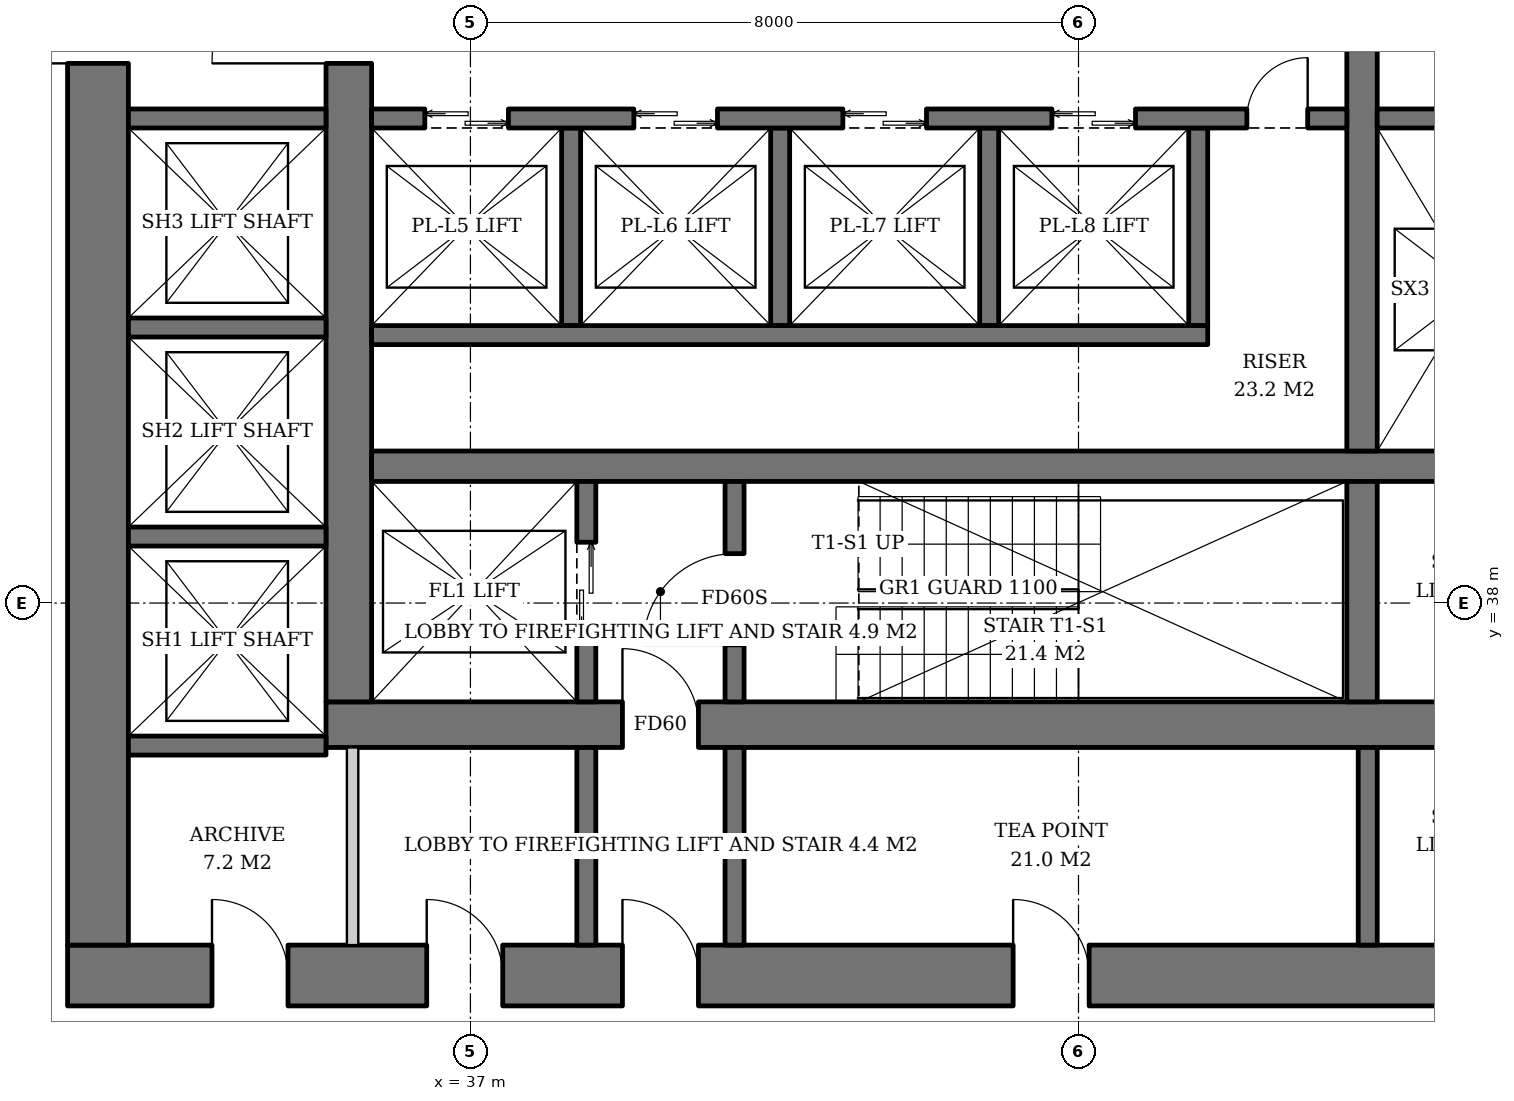
"""IFC4 building model, lengths in metres.
Left out: names, types, materials, properties, quantities, classifications, styles, units other than length and angle.
Written with IfcOpenShell. Run it as: python <this file> out.ifc"""

import sys

from ifc_helpers import new_model, si_unit, direction, frame, frame_2d, origin, place, context, subcontext, project, spatial, rectangle, extrude, element, fill, save


model = new_model("IFC4")
c1 = context("Model", 3, precision=1e-05, world=origin(), true_north=direction((0.0, 1.0)))
c2 = subcontext(c1, "Body", "Model", "MODEL_VIEW")
j1 = project(units=[si_unit("LENGTHUNIT", "METRE"), si_unit("PLANEANGLEUNIT", "RADIAN")], contexts=[c1])
p1 = place(None, origin())
s1 = spatial("IfcSite", under=j1, at=p1, CompositionType="ELEMENT")
p2 = place(p1, origin())
s2 = spatial("IfcBuilding", under=s1, at=p2, CompositionType="ELEMENT")
p3 = place(p2, frame((0.0, 0.0, 40.0)))
s3 = spatial("IfcBuildingStorey", under=s2, at=p3, CompositionType="ELEMENT", Elevation=40.0)
p4 = place(p3, frame((35.1, 36.4, 0.0), z_axis=(0.0, 0.0, 1.0), x_axis=(1.0, 0.0, 0.0)))
e1 = element("IfcWall", 1, at=p4, inside=s3, PredefinedType="SHEAR", context=c2, shape_type="SweptSolid", body=[
    extrude(rectangle(XDim=19.8, YDim=0.6, at=frame_2d((9.9, 0.0))), origin(), (0.0, 0.0, 1.0), 3.8),
])
p5 = place(p4, frame((3.9, 0.0, 0.0)))
e2 = element("IfcOpeningElement", 2, at=p5, cuts=e1, PredefinedType="OPENING", context=c2, shape_type="SweptSolid", body=[
    extrude(rectangle(XDim=1.0, YDim=2.1, at=frame_2d((0.5, 1.05))), frame((0.0, 0.31, 0.0), z_axis=(0.0, -1.0, 0.0), x_axis=(1.0, 0.0, 0.0)), (0.0, 0.0, 1.0), 0.62),
])
p6 = place(p4, frame((15.35, 0.0, 0.0)))
e3 = element("IfcOpeningElement", 3, at=p6, cuts=e1, PredefinedType="OPENING", context=c2, shape_type="SweptSolid", body=[
    extrude(rectangle(XDim=1.0, YDim=2.1, at=frame_2d((0.5, 1.05))), frame((0.0, 0.31, 0.0), z_axis=(0.0, -1.0, 0.0), x_axis=(1.0, 0.0, 0.0)), (0.0, 0.0, 1.0), 0.62),
])
p7 = place(p3, frame((35.4, 36.7, 0.0), z_axis=(0.0, 0.0, 1.0), x_axis=(0.0, 1.0, 0.0)))
e4 = element("IfcWall", 4, at=p7, inside=s3, PredefinedType="SHEAR", context=c2, shape_type="SweptSolid", body=[
    extrude(rectangle(XDim=18.6, YDim=0.6, at=frame_2d((9.3, 0.0))), origin(), (0.0, 0.0, 1.0), 3.8),
])
p8 = place(p7, frame((8.4, 0.0, 0.0)))
e5 = element("IfcOpeningElement", 5, at=p8, cuts=e4, PredefinedType="OPENING", context=c2, shape_type="SweptSolid", body=[
    extrude(rectangle(XDim=1.8, YDim=2.4, at=frame_2d((0.9, 1.2))), frame((0.0, 0.31, 0.0), z_axis=(0.0, -1.0, 0.0), x_axis=(1.0, 0.0, 0.0)), (0.0, 0.0, 1.0), 0.62),
])
p9 = place(p3, frame((31.7, 33.1, 0.0), z_axis=(0.0, 0.0, 1.0), x_axis=(1.0, 0.0, 0.0)))
e6 = element("IfcWall", 6, at=p9, inside=s3, PredefinedType="SHEAR", context=c2, shape_type="SweptSolid", body=[
    extrude(rectangle(XDim=26.6, YDim=0.8, at=frame_2d((13.3, 0.0))), origin(), (0.0, 0.0, 1.0), 3.8),
])
p10 = place(p9, frame((7.3, 0.0, 0.0)))
e7 = element("IfcOpeningElement", 7, at=p10, cuts=e6, PredefinedType="OPENING", context=c2, shape_type="SweptSolid", body=[
    extrude(rectangle(XDim=1.0, YDim=2.1, at=frame_2d((0.5, 1.05))), frame((0.0, 0.41, 0.0), z_axis=(0.0, -1.0, 0.0), x_axis=(1.0, 0.0, 0.0)), (0.0, 0.0, 1.0), 0.82),
])
p11 = place(p9, frame((18.75, 0.0, 0.0)))
e8 = element("IfcOpeningElement", 8, at=p11, cuts=e6, PredefinedType="OPENING", context=c2, shape_type="SweptSolid", body=[
    extrude(rectangle(XDim=1.0, YDim=2.1, at=frame_2d((0.5, 1.05))), frame((0.0, 0.41, 0.0), z_axis=(0.0, -1.0, 0.0), x_axis=(1.0, 0.0, 0.0)), (0.0, 0.0, 1.0), 0.82),
])
p12 = place(p9, frame((1.9, 0.0, 0.0)))
e9 = element("IfcOpeningElement", 9, at=p12, cuts=e6, PredefinedType="OPENING", context=c2, shape_type="SweptSolid", body=[
    extrude(rectangle(XDim=1.0, YDim=2.1, at=frame_2d((0.5, 1.05))), frame((0.0, 0.41, 0.0), z_axis=(0.0, -1.0, 0.0), x_axis=(1.0, 0.0, 0.0)), (0.0, 0.0, 1.0), 0.82),
])
p13 = place(p9, frame((4.725, 0.0, 0.0)))
e10 = element("IfcOpeningElement", 10, at=p13, cuts=e6, PredefinedType="OPENING", context=c2, shape_type="SweptSolid", body=[
    extrude(rectangle(XDim=1.0, YDim=2.1, at=frame_2d((0.5, 1.05))), frame((0.0, 0.41, 0.0), z_axis=(0.0, -1.0, 0.0), x_axis=(1.0, 0.0, 0.0)), (0.0, 0.0, 1.0), 0.82),
])
p14 = place(p9, frame((12.44, 0.0, 0.0)))
e11 = element("IfcOpeningElement", 11, at=p14, cuts=e6, PredefinedType="OPENING", context=c2, shape_type="SweptSolid", body=[
    extrude(rectangle(XDim=1.0, YDim=2.1, at=frame_2d((0.5, 1.05))), frame((0.0, 0.41, 0.0), z_axis=(0.0, -1.0, 0.0), x_axis=(1.0, 0.0, 0.0)), (0.0, 0.0, 1.0), 0.82),
])
p15 = place(p9, frame((20.626, 0.0, 0.0)))
e12 = element("IfcOpeningElement", 12, at=p15, cuts=e6, PredefinedType="OPENING", context=c2, shape_type="SweptSolid", body=[
    extrude(rectangle(XDim=1.0, YDim=2.1, at=frame_2d((0.5, 1.05))), frame((0.0, 0.41, 0.0), z_axis=(0.0, -1.0, 0.0), x_axis=(1.0, 0.0, 0.0)), (0.0, 0.0, 1.0), 0.82),
])
p16 = place(p9, frame((23.476, 0.0, 0.0)))
e13 = element("IfcOpeningElement", 13, at=p16, cuts=e6, PredefinedType="OPENING", context=c2, shape_type="SweptSolid", body=[
    extrude(rectangle(XDim=1.0, YDim=2.1, at=frame_2d((0.5, 1.05))), frame((0.0, 0.41, 0.0), z_axis=(0.0, -1.0, 0.0), x_axis=(1.0, 0.0, 0.0)), (0.0, 0.0, 1.0), 0.82),
])
p17 = place(p3, frame((32.1, 33.5, 0.0), z_axis=(0.0, 0.0, 1.0), x_axis=(0.0, 1.0, 0.0)))
e14 = element("IfcWall", 14, at=p17, inside=s3, PredefinedType="SHEAR", context=c2, shape_type="SweptSolid", body=[
    extrude(rectangle(XDim=25.0, YDim=0.8, at=frame_2d((12.5, 0.0))), origin(), (0.0, 0.0, 1.0), 3.8),
])
p18 = place(p17, frame((11.6, 0.0, 0.0)))
e15 = element("IfcOpeningElement", 15, at=p18, cuts=e14, PredefinedType="OPENING", context=c2, shape_type="SweptSolid", body=[
    extrude(rectangle(XDim=1.8, YDim=2.4, at=frame_2d((0.9, 1.2))), frame((0.0, 0.41, 0.0), z_axis=(0.0, -1.0, 0.0), x_axis=(1.0, 0.0, 0.0)), (0.0, 0.0, 1.0), 0.82),
])
p19 = place(p3, frame((35.7, 39.8, 0.0), z_axis=(0.0, 0.0, 1.0), x_axis=(1.0, 0.0, 0.0)))
e16 = element("IfcWall", 16, at=p19, inside=s3, PredefinedType="SHEAR", context=c2, shape_type="SweptSolid", body=[
    extrude(rectangle(XDim=18.6, YDim=0.4, at=frame_2d((9.3, 0.0))), origin(), (0.0, 0.0, 1.0), 3.8),
])
p20 = place(p3, frame((48.73, 36.7, 0.0), z_axis=(0.0, 0.0, 1.0), x_axis=(0.0, 1.0, 0.0)))
e17 = element("IfcWall", 17, at=p20, inside=s3, PredefinedType="SHEAR", context=c2, shape_type="SweptSolid", body=[
    extrude(rectangle(XDim=2.9, YDim=0.4, at=frame_2d((1.45, 0.0))), origin(), (0.0, 0.0, 1.0), 3.8),
])
p21 = place(p3, frame((48.73, 40.0, 0.0), z_axis=(0.0, 0.0, 1.0), x_axis=(0.0, 1.0, 0.0)))
e18 = element("IfcWall", 18, at=p21, inside=s3, PredefinedType="SHEAR", context=c2, shape_type="SweptSolid", body=[
    extrude(rectangle(XDim=12.0, YDim=0.4, at=frame_2d((6.0, 0.0))), origin(), (0.0, 0.0, 1.0), 3.8),
])
p22 = place(p3, frame((38.525, 36.7, 0.0), z_axis=(0.0, 0.0, 1.0), x_axis=(0.0, 1.0, 0.0)))
e19 = element("IfcWall", 19, at=p22, inside=s3, PredefinedType="SHEAR", context=c2, shape_type="SweptSolid", body=[
    extrude(rectangle(XDim=2.9, YDim=0.25, at=frame_2d((1.45, 0.0))), origin(), (0.0, 0.0, 1.0), 3.8),
])
p23 = place(p22, frame((0.8, 0.0, 0.0)))
e20 = element("IfcOpeningElement", 20, at=p23, cuts=e19, PredefinedType="OPENING", context=c2, shape_type="SweptSolid", body=[
    extrude(rectangle(XDim=1.3, YDim=2.2, at=frame_2d((0.65, 1.1))), frame((0.0, 0.135, 0.0), z_axis=(0.0, -1.0, 0.0), x_axis=(1.0, 0.0, 0.0)), (0.0, 0.0, 1.0), 0.27),
])
p24 = place(p3, frame((40.475, 36.7, 0.0), z_axis=(0.0, 0.0, 1.0), x_axis=(0.0, 1.0, 0.0)))
e21 = element("IfcWall", 21, at=p24, inside=s3, PredefinedType="SHEAR", context=c2, shape_type="SweptSolid", body=[
    extrude(rectangle(XDim=2.9, YDim=0.25, at=frame_2d((1.45, 0.0))), origin(), (0.0, 0.0, 1.0), 3.8),
])
p25 = place(p24, frame((0.75, 0.0, 0.0)))
e22 = element("IfcOpeningElement", 22, at=p25, cuts=e21, PredefinedType="OPENING", context=c2, shape_type="SweptSolid", body=[
    extrude(rectangle(XDim=1.2, YDim=2.1, at=frame_2d((0.6, 1.05))), frame((0.0, 0.135, 0.0), z_axis=(0.0, -1.0, 0.0), x_axis=(1.0, 0.0, 0.0)), (0.0, 0.0, 1.0), 0.27),
])
for number, where, z_axis, x_axis in (
    (23, (38.325, 44.25, 0.0), (0.0, 0.0, 1.0), (0.0, -1.0, 0.0)),
    (24, (41.075, 44.25, 0.0), (0.0, 0.0, 1.0), (0.0, -1.0, 0.0)),
    (25, (43.825, 44.25, 0.0), (0.0, 0.0, 1.0), (0.0, -1.0, 0.0)),
    (26, (46.575, 44.25, 0.0), (0.0, 0.0, 1.0), (0.0, -1.0, 0.0)),
):
    element("IfcWall", number, at=place(p3, frame(where, z_axis=z_axis, x_axis=x_axis)), inside=s3, PredefinedType="SHEAR", context=c2, shape_type="SweptSolid", body=[
        extrude(rectangle(XDim=2.6, YDim=0.25, at=frame_2d((1.3, 0.0))), origin(), (0.0, 0.0, 1.0), 3.8),
    ])
p26 = place(p3, frame((35.7, 41.525, 0.0), z_axis=(0.0, 0.0, 1.0), x_axis=(1.0, 0.0, 0.0)))
e27 = element("IfcWall", 27, at=p26, inside=s3, PredefinedType="SHEAR", context=c2, shape_type="SweptSolid", body=[
    extrude(rectangle(XDim=11.0, YDim=0.25, at=frame_2d((5.5, 0.0))), origin(), (0.0, 0.0, 1.0), 3.8),
])
p27 = place(p3, frame((35.7, 44.375, 0.0), z_axis=(0.0, 0.0, 1.0), x_axis=(1.0, 0.0, 0.0)))
e28 = element("IfcWall", 28, at=p27, inside=s3, PredefinedType="SHEAR", context=c2, shape_type="SweptSolid", body=[
    extrude(rectangle(XDim=12.83, YDim=0.25, at=frame_2d((6.415, 0.0))), origin(), (0.0, 0.0, 1.0), 3.8),
])
p28 = place(p27, frame((0.7, 0.0, 0.0)))
e29 = element("IfcOpeningElement", 29, at=p28, cuts=e28, PredefinedType="OPENING", context=c2, shape_type="SweptSolid", body=[
    extrude(rectangle(XDim=1.1, YDim=2.2, at=frame_2d((0.55, 1.1))), frame((0.0, 0.135, 0.0), z_axis=(0.0, -1.0, 0.0), x_axis=(1.0, 0.0, 0.0)), (0.0, 0.0, 1.0), 0.27),
])
p29 = place(p27, frame((3.45, 0.0, 0.0)))
e30 = element("IfcOpeningElement", 30, at=p29, cuts=e28, PredefinedType="OPENING", context=c2, shape_type="SweptSolid", body=[
    extrude(rectangle(XDim=1.1, YDim=2.2, at=frame_2d((0.55, 1.1))), frame((0.0, 0.135, 0.0), z_axis=(0.0, -1.0, 0.0), x_axis=(1.0, 0.0, 0.0)), (0.0, 0.0, 1.0), 0.27),
])
p30 = place(p27, frame((6.2, 0.0, 0.0)))
e31 = element("IfcOpeningElement", 31, at=p30, cuts=e28, PredefinedType="OPENING", context=c2, shape_type="SweptSolid", body=[
    extrude(rectangle(XDim=1.1, YDim=2.2, at=frame_2d((0.55, 1.1))), frame((0.0, 0.135, 0.0), z_axis=(0.0, -1.0, 0.0), x_axis=(1.0, 0.0, 0.0)), (0.0, 0.0, 1.0), 0.27),
])
p31 = place(p27, frame((8.95, 0.0, 0.0)))
e32 = element("IfcOpeningElement", 32, at=p31, cuts=e28, PredefinedType="OPENING", context=c2, shape_type="SweptSolid", body=[
    extrude(rectangle(XDim=1.1, YDim=2.2, at=frame_2d((0.55, 1.1))), frame((0.0, 0.135, 0.0), z_axis=(0.0, -1.0, 0.0), x_axis=(1.0, 0.0, 0.0)), (0.0, 0.0, 1.0), 0.27),
])
p32 = place(p27, frame((11.515, 0.0, 0.0)))
e33 = element("IfcOpeningElement", 33, at=p32, cuts=e28, PredefinedType="OPENING", context=c2, shape_type="SweptSolid", body=[
    extrude(rectangle(XDim=0.8, YDim=2.0, at=frame_2d((0.4, 1.0))), frame((0.0, 0.135, 0.0), z_axis=(0.0, -1.0, 0.0), x_axis=(1.0, 0.0, 0.0)), (0.0, 0.0, 1.0), 0.27),
])
p33 = place(p3, frame((48.93, 44.375, 0.0), z_axis=(0.0, 0.0, 1.0), x_axis=(1.0, 0.0, 0.0)))
e34 = element("IfcWall", 34, at=p33, inside=s3, PredefinedType="SHEAR", context=c2, shape_type="SweptSolid", body=[
    extrude(rectangle(XDim=5.37, YDim=0.25, at=frame_2d((2.685, 0.0))), origin(), (0.0, 0.0, 1.0), 3.8),
])
for number, where, z_axis, x_axis in (
    (35, (32.5, 36.125, 0.0), (0.0, 0.0, 1.0), (1.0, 0.0, 0.0)),
    (36, (32.5, 38.875, 0.0), (0.0, 0.0, 1.0), (1.0, 0.0, 0.0)),
    (37, (32.5, 41.625, 0.0), (0.0, 0.0, 1.0), (1.0, 0.0, 0.0)),
    (38, (32.5, 44.375, 0.0), (0.0, 0.0, 1.0), (1.0, 0.0, 0.0)),
):
    element("IfcWall", number, at=place(p3, frame(where, z_axis=z_axis, x_axis=x_axis)), inside=s3, PredefinedType="SHEAR", context=c2, shape_type="SweptSolid", body=[
        extrude(rectangle(XDim=2.6, YDim=0.25, at=frame_2d((1.3, 0.0))), origin(), (0.0, 0.0, 1.0), 3.8),
    ])
for number, where, z_axis, x_axis in (
    (39, (38.525, 33.5, 0.0), (0.0, 0.0, 1.0), (0.0, 1.0, 0.0)),
    (40, (40.475, 33.5, 0.0), (0.0, 0.0, 1.0), (0.0, 1.0, 0.0)),
    (41, (48.805, 33.5, 0.0), (0.0, 0.0, 1.0), (0.0, 1.0, 0.0)),
):
    element("IfcWall", number, at=place(p3, frame(where, z_axis=z_axis, x_axis=x_axis)), inside=s3, PredefinedType="SOLIDWALL", context=c2, shape_type="SweptSolid", body=[
        extrude(rectangle(XDim=2.6, YDim=0.25, at=frame_2d((1.3, 0.0))), origin(), (0.0, 0.0, 1.0), 3.62),
    ])
p34 = place(p3, frame((35.45, 33.5, 0.0), z_axis=(0.0, 0.0, 1.0), x_axis=(0.0, 1.0, 0.0)))
e42 = element("IfcWall", 42, at=p34, inside=s3, PredefinedType="SOLIDWALL", context=c2, shape_type="SweptSolid", body=[
    extrude(rectangle(XDim=2.6, YDim=0.15, at=frame_2d((1.3, 0.0))), origin(), (0.0, 0.0, 1.0), 3.62),
])
p35 = place(p23, origin())
e43 = element("IfcDoor", 43, at=p35, inside=s3, OperationType="DOUBLE_DOOR_SLIDING", PredefinedType="DOOR", context=c2, shape_type="SweptSolid", body=[
    extrude(rectangle(XDim=1.3, YDim=2.2, at=frame_2d((0.65, 1.1))), frame((0.0, 0.025, 0.0), z_axis=(0.0, -1.0, 0.0), x_axis=(1.0, 0.0, 0.0)), (0.0, 0.0, 1.0), 0.05),
])
fill(e20, e43)
p36 = place(p25, origin())
e44 = element("IfcDoor", 44, at=p36, inside=s3, OperationType="SINGLE_SWING_LEFT", PredefinedType="DOOR", context=c2, shape_type="SweptSolid", body=[
    extrude(rectangle(XDim=1.2, YDim=2.1, at=frame_2d((0.6, 1.05))), frame((0.0, 0.025, 0.0), z_axis=(0.0, -1.0, 0.0), x_axis=(1.0, 0.0, 0.0)), (0.0, 0.0, 1.0), 0.05),
])
fill(e22, e44)
p37 = place(p28, origin())
e45 = element("IfcDoor", 45, at=p37, inside=s3, OperationType="DOUBLE_DOOR_SLIDING", PredefinedType="DOOR", context=c2, shape_type="SweptSolid", body=[
    extrude(rectangle(XDim=1.1, YDim=2.2, at=frame_2d((0.55, 1.1))), frame((0.0, 0.025, 0.0), z_axis=(0.0, -1.0, 0.0), x_axis=(1.0, 0.0, 0.0)), (0.0, 0.0, 1.0), 0.05),
])
fill(e29, e45)
p38 = place(p29, origin())
e46 = element("IfcDoor", 46, at=p38, inside=s3, OperationType="DOUBLE_DOOR_SLIDING", PredefinedType="DOOR", context=c2, shape_type="SweptSolid", body=[
    extrude(rectangle(XDim=1.1, YDim=2.2, at=frame_2d((0.55, 1.1))), frame((0.0, 0.025, 0.0), z_axis=(0.0, -1.0, 0.0), x_axis=(1.0, 0.0, 0.0)), (0.0, 0.0, 1.0), 0.05),
])
fill(e30, e46)
p39 = place(p30, origin())
e47 = element("IfcDoor", 47, at=p39, inside=s3, OperationType="DOUBLE_DOOR_SLIDING", PredefinedType="DOOR", context=c2, shape_type="SweptSolid", body=[
    extrude(rectangle(XDim=1.1, YDim=2.2, at=frame_2d((0.55, 1.1))), frame((0.0, 0.025, 0.0), z_axis=(0.0, -1.0, 0.0), x_axis=(1.0, 0.0, 0.0)), (0.0, 0.0, 1.0), 0.05),
])
fill(e31, e47)
p40 = place(p31, origin())
e48 = element("IfcDoor", 48, at=p40, inside=s3, OperationType="DOUBLE_DOOR_SLIDING", PredefinedType="DOOR", context=c2, shape_type="SweptSolid", body=[
    extrude(rectangle(XDim=1.1, YDim=2.2, at=frame_2d((0.55, 1.1))), frame((0.0, 0.025, 0.0), z_axis=(0.0, -1.0, 0.0), x_axis=(1.0, 0.0, 0.0)), (0.0, 0.0, 1.0), 0.05),
])
fill(e32, e48)
p41 = place(p32, origin())
e49 = element("IfcDoor", 49, at=p41, inside=s3, OperationType="SINGLE_SWING_RIGHT", PredefinedType="DOOR", context=c2, shape_type="SweptSolid", body=[
    extrude(rectangle(XDim=0.8, YDim=2.0, at=frame_2d((0.4, 1.0))), frame((0.0, 0.025, 0.0), z_axis=(0.0, -1.0, 0.0), x_axis=(1.0, 0.0, 0.0)), (0.0, 0.0, 1.0), 0.05),
])
fill(e33, e49)
p42 = place(p5, origin())
e50 = element("IfcDoor", 50, at=p42, inside=s3, OperationType="SINGLE_SWING_LEFT", PredefinedType="DOOR", context=c2, shape_type="SweptSolid", body=[
    extrude(rectangle(XDim=1.0, YDim=2.1, at=frame_2d((0.5, 1.05))), frame((0.0, 0.025, 0.0), z_axis=(0.0, -1.0, 0.0), x_axis=(1.0, 0.0, 0.0)), (0.0, 0.0, 1.0), 0.05),
])
fill(e2, e50)
p43 = place(p8, origin())
e51 = element("IfcDoor", 51, at=p43, inside=s3, OperationType="DOUBLE_DOOR_SINGLE_SWING", PredefinedType="DOOR", context=c2, shape_type="SweptSolid", body=[
    extrude(rectangle(XDim=1.8, YDim=2.4, at=frame_2d((0.9, 1.2))), frame((0.0, 0.025, 0.0), z_axis=(0.0, -1.0, 0.0), x_axis=(1.0, 0.0, 0.0)), (0.0, 0.0, 1.0), 0.05),
])
fill(e5, e51)
p44 = place(p18, origin())
e52 = element("IfcDoor", 52, at=p44, inside=s3, OperationType="DOUBLE_DOOR_SINGLE_SWING", PredefinedType="DOOR", context=c2, shape_type="SweptSolid", body=[
    extrude(rectangle(XDim=1.8, YDim=2.4, at=frame_2d((0.9, 1.2))), frame((0.0, 0.025, 0.0), z_axis=(0.0, -1.0, 0.0), x_axis=(1.0, 0.0, 0.0)), (0.0, 0.0, 1.0), 0.05),
])
fill(e15, e52)
p45 = place(p10, origin())
e53 = element("IfcDoor", 53, at=p45, inside=s3, OperationType="SINGLE_SWING_LEFT", PredefinedType="DOOR", context=c2, shape_type="SweptSolid", body=[
    extrude(rectangle(XDim=1.0, YDim=2.1, at=frame_2d((0.5, 1.05))), frame((0.0, 0.025, 0.0), z_axis=(0.0, -1.0, 0.0), x_axis=(1.0, 0.0, 0.0)), (0.0, 0.0, 1.0), 0.05),
])
fill(e7, e53)
p46 = place(p12, origin())
e54 = element("IfcDoor", 54, at=p46, inside=s3, OperationType="SINGLE_SWING_LEFT", PredefinedType="DOOR", context=c2, shape_type="SweptSolid", body=[
    extrude(rectangle(XDim=1.0, YDim=2.1, at=frame_2d((0.5, 1.05))), frame((0.0, 0.39, 0.0), z_axis=(0.0, -1.0, 0.0), x_axis=(1.0, 0.0, 0.0)), (0.0, 0.0, 1.0), 0.05),
])
fill(e9, e54)
p47 = place(p13, origin())
e55 = element("IfcDoor", 55, at=p47, inside=s3, OperationType="SINGLE_SWING_LEFT", PredefinedType="DOOR", context=c2, shape_type="SweptSolid", body=[
    extrude(rectangle(XDim=1.0, YDim=2.1, at=frame_2d((0.5, 1.05))), frame((0.0, 0.39, 0.0), z_axis=(0.0, -1.0, 0.0), x_axis=(1.0, 0.0, 0.0)), (0.0, 0.0, 1.0), 0.05),
])
fill(e10, e55)
p48 = place(p14, origin())
e56 = element("IfcDoor", 56, at=p48, inside=s3, OperationType="SINGLE_SWING_LEFT", PredefinedType="DOOR", context=c2, shape_type="SweptSolid", body=[
    extrude(rectangle(XDim=1.0, YDim=2.1, at=frame_2d((0.5, 1.05))), frame((0.0, 0.39, 0.0), z_axis=(0.0, -1.0, 0.0), x_axis=(1.0, 0.0, 0.0)), (0.0, 0.0, 1.0), 0.05),
])
fill(e11, e56)
save(model, sys.argv[1])
